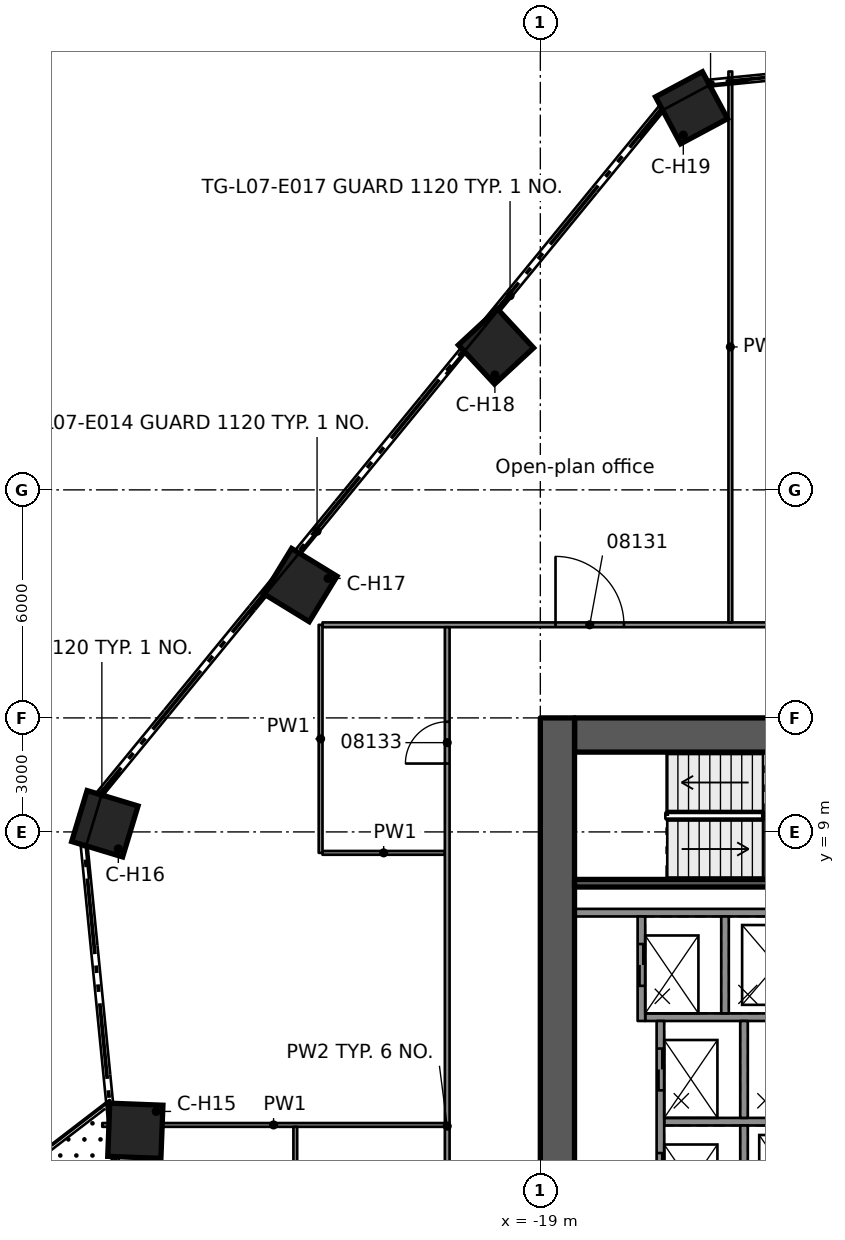
"""IFC4 building model, lengths in metres.
Left out: names, types, materials, properties, quantities, classifications, styles, units other than length and angle.
Written with IfcOpenShell. Run it as: python <this file> out.ifc"""

import sys

from ifc_helpers import new_model, si_unit, direction, frame, frame_2d, origin, origin_2d, place, context, subcontext, project, spatial, rectangle, extrude, element, fill, save


model = new_model("IFC4")
c1 = context("Model", 3, precision=1e-05, world=origin(), true_north=direction((0.0, 1.0)))
c2 = subcontext(c1, "Body", "Model", "MODEL_VIEW")
j1 = project(units=[si_unit("LENGTHUNIT", "METRE"), si_unit("PLANEANGLEUNIT", "RADIAN")], contexts=[c1])
p1 = place(None, origin())
s1 = spatial("IfcSite", under=j1, at=p1, CompositionType="ELEMENT")
p2 = place(p1, origin())
s2 = spatial("IfcBuilding", under=s1, at=p2, CompositionType="ELEMENT")
p3 = place(p2, frame((0.0, 0.0, 37.3)))
s3 = spatial("IfcBuildingStorey", under=s2, at=p3, CompositionType="ELEMENT", Elevation=37.3)
p4 = place(p3, frame((-18.1, 11.55, 0.0), z_axis=(0.0, 0.0, 1.0), x_axis=(1.0, 0.0, 0.0)))
e1 = element("IfcWall", 1, at=p4, inside=s3, PredefinedType="SHEAR", context=c2, shape_type="SweptSolid", body=[
    extrude(rectangle(XDim=9.2, YDim=0.9, at=frame_2d((4.6, 0.0))), origin(), (0.0, 0.0, 1.0), 3.5),
])
p5 = place(p4, frame((5.1, 0.0, 0.0)))
e2 = element("IfcOpeningElement", 2, at=p5, cuts=e1, PredefinedType="OPENING", context=c2, shape_type="SweptSolid", body=[
    extrude(rectangle(XDim=1.1, YDim=2.1, at=frame_2d((0.55, 1.05))), frame((0.0, 0.46, 0.0), z_axis=(0.0, -1.0, 0.0), x_axis=(1.0, 0.0, 0.0)), (0.0, 0.0, 1.0), 0.92),
])
p6 = place(p3, frame((-18.55, -12.0, 0.0), z_axis=(0.0, 0.0, 1.0), x_axis=(0.0, 1.0, 0.0)))
e3 = element("IfcWall", 3, at=p6, inside=s3, PredefinedType="SHEAR", context=c2, shape_type="SweptSolid", body=[
    extrude(rectangle(XDim=24.0, YDim=0.9, at=frame_2d((12.0, 0.0))), origin(), (0.0, 0.0, 1.0), 3.5),
])
p7 = place(p6, frame((10.1, 0.0, 0.0)))
e4 = element("IfcOpeningElement", 4, at=p7, cuts=e3, PredefinedType="OPENING", context=c2, shape_type="SweptSolid", body=[
    extrude(rectangle(XDim=1.8, YDim=2.1, at=frame_2d((0.9, 1.05))), frame((0.0, 0.46, 0.0), z_axis=(0.0, -1.0, 0.0), x_axis=(1.0, 0.0, 0.0)), (0.0, 0.0, 1.0), 0.92),
])
for number, where, z_axis, x_axis in (
    (5, (-29.657, 1.136, 0.0), (0.0, 0.0, 1.0), (-0.999, 0.038, 0.0)),
    (6, (-30.459, 9.215, 0.0), (0.0, 0.0, 1.0), (-0.957, 0.29, 0.0)),
    (7, (-25.313, 15.495, 0.0), (0.0, 0.0, 1.0), (-0.853, 0.522, 0.0)),
    (8, (-20.167, 21.774, 0.0), (0.0, 0.0, 1.0), (-0.68, 0.734, 0.0)),
    (9, (-15.021, 28.054, 0.0), (0.0, 0.0, 1.0), (-0.472, 0.882, 0.0)),
):
    element("IfcColumn", number, at=place(p3, frame(where, z_axis=z_axis, x_axis=x_axis)), inside=s3, PredefinedType="COLUMN", context=c2, shape_type="SweptSolid", body=[
        extrude(rectangle(XDim=1.4, YDim=1.4, at=origin_2d()), origin(), (0.0, 0.0, 1.0), 3.5),
    ])
p8 = place(p3, frame((-11.54, 6.875, 0.0), z_axis=(0.0, 0.0, 1.0), x_axis=(-1.0, 0.0, 0.0)))
e10 = element("IfcWall", 10, at=p8, inside=s3, PredefinedType="SOLIDWALL", context=c2, shape_type="SweptSolid", body=[
    extrude(rectangle(XDim=6.56, YDim=0.2, at=frame_2d((3.28, 0.0))), origin(), (0.0, 0.0, 1.0), 3.08),
])
p9 = place(p3, frame((-11.54, 1.375, 0.0), z_axis=(0.0, 0.0, 1.0), x_axis=(-1.0, 0.0, 0.0)))
e11 = element("IfcWall", 11, at=p9, inside=s3, PredefinedType="SOLIDWALL", context=c2, shape_type="SweptSolid", body=[
    extrude(rectangle(XDim=4.2, YDim=0.2, at=frame_2d((2.1, 0.0))), origin(), (0.0, 0.0, 1.0), 3.08),
])
p10 = place(p3, frame((-11.54, 4.125, 0.0), z_axis=(0.0, 0.0, 1.0), x_axis=(-1.0, 0.0, 0.0)))
e12 = element("IfcWall", 12, at=p10, inside=s3, PredefinedType="SOLIDWALL", context=c2, shape_type="SweptSolid", body=[
    extrude(rectangle(XDim=4.7, YDim=0.2, at=frame_2d((2.35, 0.0))), origin(), (0.0, 0.0, 1.0), 3.08),
])
for number, where, z_axis, x_axis in (
    (13, (-13.64, -1.275, 0.0), (0.0, 0.0, 1.0), (0.0, 1.0, 0.0)),
    (14, (-13.64, 1.475, 0.0), (0.0, 0.0, 1.0), (0.0, 1.0, 0.0)),
    (15, (-14.14, 4.225, 0.0), (0.0, 0.0, 1.0), (0.0, 1.0, 0.0)),
):
    element("IfcWall", number, at=place(p3, frame(where, z_axis=z_axis, x_axis=x_axis)), inside=s3, PredefinedType="SOLIDWALL", context=c2, shape_type="SweptSolid", body=[
        extrude(rectangle(XDim=2.55, YDim=0.2, at=frame_2d((1.275, 0.0))), origin(), (0.0, 0.0, 1.0), 3.08),
    ])
p11 = place(p3, frame((-15.84, -4.025, 0.0), z_axis=(0.0, 0.0, 1.0), x_axis=(0.0, 1.0, 0.0)))
e16 = element("IfcWall", 16, at=p11, inside=s3, PredefinedType="SOLIDWALL", context=c2, shape_type="SweptSolid", body=[
    extrude(rectangle(XDim=8.05, YDim=0.2, at=frame_2d((4.025, 0.0))), origin(), (0.0, 0.0, 1.0), 3.08),
])
p12 = place(p11, frame((3.475, 0.0, 0.0)))
e17 = element("IfcOpeningElement", 17, at=p12, cuts=e16, PredefinedType="OPENING", context=c2, shape_type="SweptSolid", body=[
    extrude(rectangle(XDim=1.1, YDim=2.1, at=frame_2d((0.55, 1.05))), frame((0.0, 0.11, 0.0), z_axis=(0.0, -1.0, 0.0), x_axis=(1.0, 0.0, 0.0)), (0.0, 0.0, 1.0), 0.22),
])
p13 = place(p11, frame((6.225, 0.0, 0.0)))
e18 = element("IfcOpeningElement", 18, at=p13, cuts=e16, PredefinedType="OPENING", context=c2, shape_type="SweptSolid", body=[
    extrude(rectangle(XDim=1.1, YDim=2.1, at=frame_2d((0.55, 1.05))), frame((0.0, 0.11, 0.0), z_axis=(0.0, -1.0, 0.0), x_axis=(1.0, 0.0, 0.0)), (0.0, 0.0, 1.0), 0.22),
])
p14 = place(p3, frame((-16.34, 4.025, 0.0), z_axis=(0.0, 0.0, 1.0), x_axis=(0.0, 1.0, 0.0)))
e19 = element("IfcWall", 19, at=p14, inside=s3, PredefinedType="SOLIDWALL", context=c2, shape_type="SweptSolid", body=[
    extrude(rectangle(XDim=2.75, YDim=0.2, at=frame_2d((1.375, 0.0))), origin(), (0.0, 0.0, 1.0), 3.08),
])
p15 = place(p14, frame((0.925, 0.0, 0.0)))
e20 = element("IfcOpeningElement", 20, at=p15, cuts=e19, PredefinedType="OPENING", context=c2, shape_type="SweptSolid", body=[
    extrude(rectangle(XDim=1.1, YDim=2.1, at=frame_2d((0.55, 1.05))), frame((0.0, 0.11, 0.0), z_axis=(0.0, -1.0, 0.0), x_axis=(1.0, 0.0, 0.0)), (0.0, 0.0, 1.0), 0.22),
])
p16 = place(p3, frame((-11.54, 7.65, 0.0), z_axis=(0.0, 0.0, 1.0), x_axis=(-1.0, 0.0, 0.0)))
e21 = element("IfcWall", 21, at=p16, inside=s3, PredefinedType="SOLIDWALL", context=c2, shape_type="SweptSolid", body=[
    extrude(rectangle(XDim=6.56, YDim=0.2, at=frame_2d((3.28, 0.0))), origin(), (0.0, 0.0, 1.0), 3.08),
])
p17 = place(p3, frame((-30.527, 1.29, 0.0), z_axis=(0.0, 0.0, 1.0), x_axis=(1.0, 0.0, 0.0)))
e22 = element("IfcWall", 22, at=p17, inside=s3, PredefinedType="PARTITIONING", context=c2, shape_type="SweptSolid", body=[
    extrude(rectangle(XDim=9.015, YDim=0.1, at=frame_2d((4.508, 0.0))), origin(), (0.0, 0.0, 1.0), 3.06),
])
p18 = place(p3, frame((-24.732, 8.449, 0.0), z_axis=(0.0, 0.0, 1.0), x_axis=(1.0, 0.0, 0.0)))
e23 = element("IfcWall", 23, at=p18, inside=s3, PredefinedType="PARTITIONING", context=c2, shape_type="SweptSolid", body=[
    extrude(rectangle(XDim=3.22, YDim=0.1, at=frame_2d((1.61, 0.0))), origin(), (0.0, 0.0, 1.0), 3.06),
])
p19 = place(p3, frame((-24.731, 14.45, 0.0), z_axis=(0.0, 0.0, 1.0), x_axis=(1.0, 0.0, 0.0)))
e24 = element("IfcWall", 24, at=p19, inside=s3, PredefinedType="PARTITIONING", context=c2, shape_type="SweptSolid", body=[
    extrude(rectangle(XDim=14.34, YDim=0.125, at=frame_2d((7.17, 0.0))), origin(), (0.0, 0.0, 1.0), 3.06),
])
p20 = place(p19, frame((6.131, 0.0, 0.0)))
e25 = element("IfcOpeningElement", 25, at=p20, cuts=e24, PredefinedType="OPENING", context=c2, shape_type="SweptSolid", body=[
    extrude(rectangle(XDim=1.8, YDim=2.1, at=frame_2d((0.9, 1.05))), frame((0.0, 0.073, 0.0), z_axis=(0.0, -1.0, 0.0), x_axis=(1.0, 0.0, 0.0)), (0.0, 0.0, 1.0), 0.145),
])
p21 = place(p3, frame((-14.0, 14.514, 0.0), z_axis=(0.0, 0.0, 1.0), x_axis=(0.0, 1.0, 0.0)))
e26 = element("IfcWall", 26, at=p21, inside=s3, PredefinedType="PARTITIONING", context=c2, shape_type="SweptSolid", body=[
    extrude(rectangle(XDim=14.495, YDim=0.1, at=frame_2d((7.248, 0.0))), origin(), (0.0, 0.0, 1.0), 3.06),
])
p22 = place(p3, frame((-21.45, -11.869, 0.0), z_axis=(0.0, 0.0, 1.0), x_axis=(0.0, 1.0, 0.0)))
e27 = element("IfcWall", 27, at=p22, inside=s3, PredefinedType="PARTITIONING", context=c2, shape_type="SweptSolid", body=[
    extrude(rectangle(XDim=26.255, YDim=0.125, at=frame_2d((13.127, 0.0))), origin(), (0.0, 0.0, 1.0), 3.06),
])
p23 = place(p22, frame((9.76, 0.0, 0.0)))
e28 = element("IfcOpeningElement", 28, at=p23, cuts=e27, PredefinedType="OPENING", context=c2, shape_type="SweptSolid", body=[
    extrude(rectangle(XDim=0.9, YDim=2.1, at=frame_2d((0.45, 1.05))), frame((0.0, 0.073, 0.0), z_axis=(0.0, -1.0, 0.0), x_axis=(1.0, 0.0, 0.0)), (0.0, 0.0, 1.0), 0.145),
])
p24 = place(p22, frame((22.668, 0.0, 0.0)))
e29 = element("IfcOpeningElement", 29, at=p24, cuts=e27, PredefinedType="OPENING", context=c2, shape_type="SweptSolid", body=[
    extrude(rectangle(XDim=1.1, YDim=2.1, at=frame_2d((0.55, 1.05))), frame((0.0, 0.073, 0.0), z_axis=(0.0, -1.0, 0.0), x_axis=(1.0, 0.0, 0.0)), (0.0, 0.0, 1.0), 0.145),
])
p25 = place(p3, frame((-24.782, 8.449, 0.0), z_axis=(0.0, 0.0, 1.0), x_axis=(0.0, 1.0, 0.0)))
e30 = element("IfcWall", 30, at=p25, inside=s3, PredefinedType="PARTITIONING", context=c2, shape_type="SweptSolid", body=[
    extrude(rectangle(XDim=6.0, YDim=0.1, at=frame_2d((3.0, 0.0))), origin(), (0.0, 0.0, 1.0), 3.06),
])
p26 = place(p3, frame((-25.448, -4.709, 0.0), z_axis=(0.0, 0.0, 1.0), x_axis=(0.0, 1.0, 0.0)))
e31 = element("IfcWall", 31, at=p26, inside=s3, PredefinedType="PARTITIONING", context=c2, shape_type="SweptSolid", body=[
    extrude(rectangle(XDim=5.949, YDim=0.1, at=frame_2d((2.975, 0.0))), origin(), (0.0, 0.0, 1.0), 3.06),
])
p27 = place(p12, origin())
e32 = element("IfcDoor", 32, at=p27, inside=s3, OperationType="DOUBLE_DOOR_SLIDING", PredefinedType="DOOR", context=c2, shape_type="SweptSolid", body=[
    extrude(rectangle(XDim=1.1, YDim=2.1, at=frame_2d((0.55, 1.05))), frame((0.0, 0.025, 0.0), z_axis=(0.0, -1.0, 0.0), x_axis=(1.0, 0.0, 0.0)), (0.0, 0.0, 1.0), 0.05),
])
fill(e17, e32)
p28 = place(p13, origin())
e33 = element("IfcDoor", 33, at=p28, inside=s3, OperationType="DOUBLE_DOOR_SLIDING", PredefinedType="DOOR", context=c2, shape_type="SweptSolid", body=[
    extrude(rectangle(XDim=1.1, YDim=2.1, at=frame_2d((0.55, 1.05))), frame((0.0, 0.025, 0.0), z_axis=(0.0, -1.0, 0.0), x_axis=(1.0, 0.0, 0.0)), (0.0, 0.0, 1.0), 0.05),
])
fill(e18, e33)
p29 = place(p15, origin())
e34 = element("IfcDoor", 34, at=p29, inside=s3, OperationType="DOUBLE_DOOR_SLIDING", PredefinedType="DOOR", context=c2, shape_type="SweptSolid", body=[
    extrude(rectangle(XDim=1.1, YDim=2.1, at=frame_2d((0.55, 1.05))), frame((0.0, 0.025, 0.0), z_axis=(0.0, -1.0, 0.0), x_axis=(1.0, 0.0, 0.0)), (0.0, 0.0, 1.0), 0.05),
])
fill(e20, e34)
p30 = place(p20, origin())
e35 = element("IfcDoor", 35, at=p30, inside=s3, OperationType="DOUBLE_DOOR_SINGLE_SWING", PredefinedType="DOOR", context=c2, shape_type="SweptSolid", body=[
    extrude(rectangle(XDim=1.8, YDim=2.1, at=frame_2d((0.9, 1.05))), frame((0.0, 0.025, 0.0), z_axis=(0.0, -1.0, 0.0), x_axis=(1.0, 0.0, 0.0)), (0.0, 0.0, 1.0), 0.05),
])
fill(e25, e35)
p31 = place(p24, origin())
e36 = element("IfcDoor", 36, at=p31, inside=s3, OperationType="SINGLE_SWING_RIGHT", PredefinedType="DOOR", context=c2, shape_type="SweptSolid", body=[
    extrude(rectangle(XDim=1.1, YDim=2.1, at=frame_2d((0.55, 1.05))), frame((0.0, 0.025, 0.0), z_axis=(0.0, -1.0, 0.0), x_axis=(1.0, 0.0, 0.0)), (0.0, 0.0, 1.0), 0.05),
])
fill(e29, e36)
save(model, sys.argv[1])
